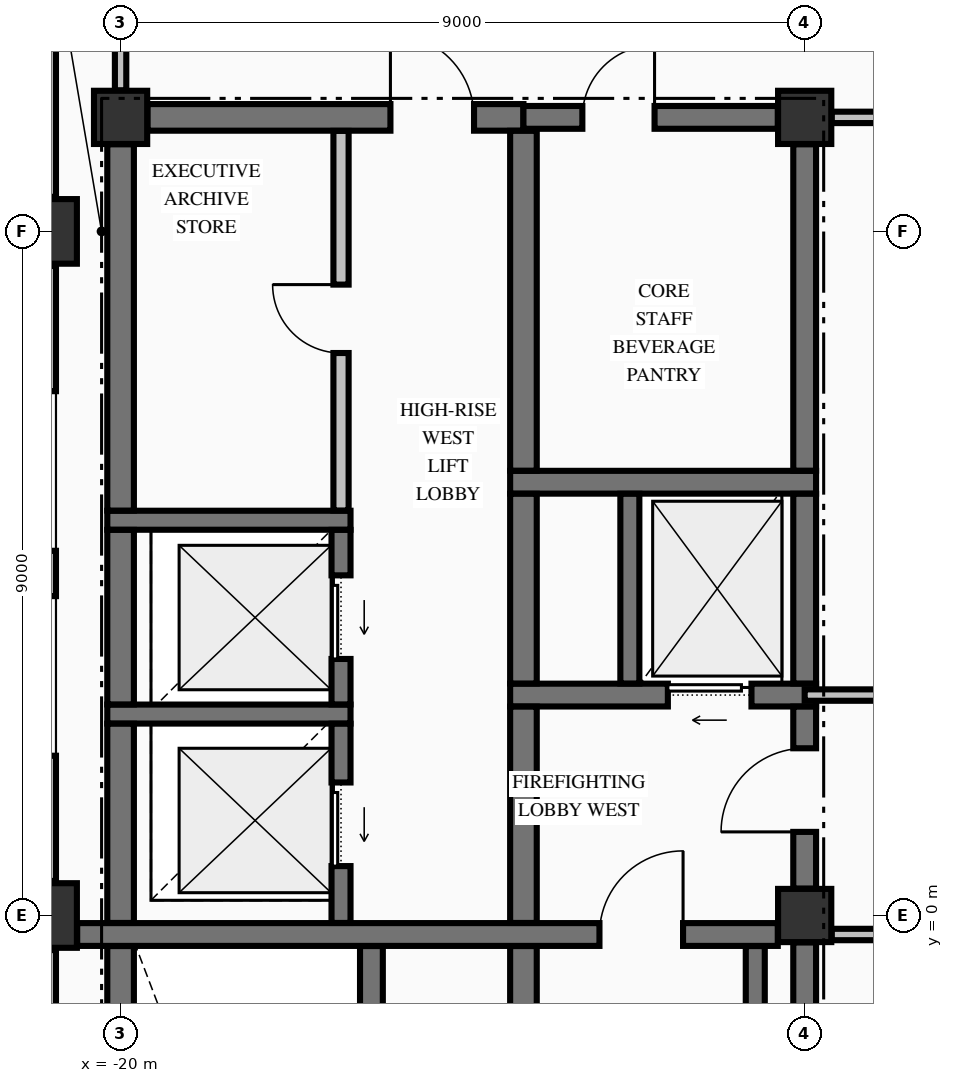
"""IFC4 building model, lengths in metres.
Left out: names, types, materials, properties, quantities, classifications, styles, units other than length and angle.
Written with IfcOpenShell. Run it as: python <this file> out.ifc"""

import sys

from ifc_helpers import new_model, si_unit, direction, frame, frame_2d, origin, origin_2d, place, context, subcontext, project, spatial, rectangle, extrude, element, fill, save


model = new_model("IFC4")
c1 = context("Model", 3, precision=1e-05, world=origin(), true_north=direction((0.0, 1.0)))
c2 = subcontext(c1, "Body", "Model", "MODEL_VIEW")
j1 = project(units=[si_unit("LENGTHUNIT", "METRE"), si_unit("PLANEANGLEUNIT", "RADIAN")], contexts=[c1])
p1 = place(None, origin())
s1 = spatial("IfcSite", under=j1, at=p1, CompositionType="ELEMENT")
p2 = place(p1, origin())
s2 = spatial("IfcBuilding", under=s1, at=p2, CompositionType="ELEMENT")
p3 = place(p2, frame((0.0, 0.0, 236.51)))
s3 = spatial("IfcBuildingStorey", under=s2, at=p3, CompositionType="ELEMENT", Elevation=236.51)
for number, where, z_axis, x_axis in (
    (1, (-21.0, 0.0, -0.25), (0.0, 0.0, 1.0), (1.0, 0.0, 0.0)),
    (2, (-21.0, 9.0, -0.25), (0.0, 0.0, 1.0), (1.0, 0.0, 0.0)),
):
    element("IfcColumn", number, at=place(p3, frame(where, z_axis=z_axis, x_axis=x_axis)), inside=s3, PredefinedType="COLUMN", context=c2, shape_type="SweptSolid", body=[
        extrude(rectangle(XDim=0.85, YDim=0.85, at=origin_2d()), origin(), (0.0, 0.0, 1.0), 3.23),
    ])
for number, where, z_axis, x_axis in (
    (3, (-20.0, 10.5, -0.25), (0.0, 0.0, 1.0), (1.0, 0.0, 0.0)),
    (4, (-11.0, 0.0, -0.25), (0.0, 0.0, 1.0), (1.0, 0.0, 0.0)),
    (5, (-11.0, 10.5, -0.25), (0.0, 0.0, 1.0), (1.0, 0.0, 0.0)),
):
    element("IfcColumn", number, at=place(p3, frame(where, z_axis=z_axis, x_axis=x_axis)), inside=s3, PredefinedType="COLUMN", context=c2, shape_type="SweptSolid", body=[
        extrude(rectangle(XDim=0.7, YDim=0.7, at=origin_2d()), origin(), (0.0, 0.0, 1.0), 3.23),
    ])
p4 = place(p3, frame((-21.0, -0.455, 0.0), z_axis=(0.0, 0.0, 1.0), x_axis=(0.0, -1.0, 0.0)))
e6 = element("IfcWall", 6, at=p4, inside=s3, PredefinedType="STANDARD", context=c2, shape_type="SweptSolid", body=[
    extrude(rectangle(XDim=8.09, YDim=0.3, at=frame_2d((4.045, 0.0))), origin(), (0.0, 0.0, 1.0), 2.372),
])
p5 = place(p4, frame((1.647, 0.0, 0.7)))
e7 = element("IfcOpeningElement", 7, at=p5, cuts=e6, PredefinedType="OPENING", context=c2, shape_type="SweptSolid", body=[
    extrude(rectangle(XDim=2.1, YDim=1.5, at=frame_2d((1.05, 0.75))), frame((0.0, 0.16, 0.0), z_axis=(0.0, -1.0, 0.0), x_axis=(1.0, 0.0, 0.0)), (0.0, 0.0, 1.0), 0.32),
])
p6 = place(p4, frame((4.343, 0.0, 0.7)))
e8 = element("IfcOpeningElement", 8, at=p6, cuts=e6, PredefinedType="OPENING", context=c2, shape_type="SweptSolid", body=[
    extrude(rectangle(XDim=2.1, YDim=1.5, at=frame_2d((1.05, 0.75))), frame((0.0, 0.16, 0.0), z_axis=(0.0, -1.0, 0.0), x_axis=(1.0, 0.0, 0.0)), (0.0, 0.0, 1.0), 0.32),
])
p7 = place(p3, frame((-21.0, 8.545, 0.0), z_axis=(0.0, 0.0, 1.0), x_axis=(0.0, -1.0, 0.0)))
e9 = element("IfcWall", 9, at=p7, inside=s3, PredefinedType="STANDARD", context=c2, shape_type="SweptSolid", body=[
    extrude(rectangle(XDim=8.09, YDim=0.3, at=frame_2d((4.045, 0.0))), origin(), (0.0, 0.0, 1.0), 2.372),
])
p8 = place(p7, frame((1.647, 0.0, 0.7)))
e10 = element("IfcOpeningElement", 10, at=p8, cuts=e9, PredefinedType="OPENING", context=c2, shape_type="SweptSolid", body=[
    extrude(rectangle(XDim=2.1, YDim=1.5, at=frame_2d((1.05, 0.75))), frame((0.0, 0.16, 0.0), z_axis=(0.0, -1.0, 0.0), x_axis=(1.0, 0.0, 0.0)), (0.0, 0.0, 1.0), 0.32),
])
p9 = place(p7, frame((4.343, 0.0, 0.7)))
e11 = element("IfcOpeningElement", 11, at=p9, cuts=e9, PredefinedType="OPENING", context=c2, shape_type="SweptSolid", body=[
    extrude(rectangle(XDim=2.1, YDim=1.5, at=frame_2d((1.05, 0.75))), frame((0.0, 0.16, 0.0), z_axis=(0.0, -1.0, 0.0), x_axis=(1.0, 0.0, 0.0)), (0.0, 0.0, 1.0), 0.32),
])
p10 = place(p3, frame((-21.0, 17.545, 0.0), z_axis=(0.0, 0.0, 1.0), x_axis=(0.0, -1.0, 0.0)))
e12 = element("IfcWall", 12, at=p10, inside=s3, PredefinedType="STANDARD", context=c2, shape_type="SweptSolid", body=[
    extrude(rectangle(XDim=8.09, YDim=0.3, at=frame_2d((4.045, 0.0))), origin(), (0.0, 0.0, 1.0), 2.372),
])
p11 = place(p3, frame((-20.571, -0.25, 0.0), z_axis=(0.0, 0.0, 1.0), x_axis=(1.0, 0.0, 0.0)))
e13 = element("IfcWall", 13, at=p11, inside=s3, PredefinedType="SHEAR", context=c2, shape_type="SweptSolid", body=[
    extrude(rectangle(XDim=9.217, YDim=0.3, at=frame_2d((4.608, 0.0))), origin(), (0.0, 0.0, 1.0), 2.98),
])
p12 = place(p11, frame((6.871, 0.0, 0.0)))
e14 = element("IfcOpeningElement", 14, at=p12, cuts=e13, PredefinedType="OPENING", context=c2, shape_type="SweptSolid", body=[
    extrude(rectangle(XDim=1.1, YDim=2.15, at=frame_2d((0.55, 1.075))), frame((0.0, 0.16, 0.0), z_axis=(0.0, -1.0, 0.0), x_axis=(1.0, 0.0, 0.0)), (0.0, 0.0, 1.0), 0.32),
])
p13 = place(p3, frame((-20.175, 2.65, 0.0), z_axis=(0.0, 0.0, 1.0), x_axis=(1.0, 0.0, 0.0)))
e15 = element("IfcWall", 15, at=p13, inside=s3, PredefinedType="SOLIDWALL", context=c2, shape_type="SweptSolid", body=[
    extrude(rectangle(XDim=3.2, YDim=0.25, at=frame_2d((1.6, 0.0))), origin(), (0.0, 0.0, 1.0), 2.98),
])
p14 = place(p3, frame((-14.875, 2.9, 0.0), z_axis=(0.0, 0.0, 1.0), x_axis=(1.0, 0.0, 0.0)))
e16 = element("IfcWall", 16, at=p14, inside=s3, PredefinedType="SHEAR", context=c2, shape_type="SweptSolid", body=[
    extrude(rectangle(XDim=4.025, YDim=0.3, at=frame_2d((2.012, 0.0))), origin(), (0.0, 0.0, 1.0), 2.98),
])
p15 = place(p14, frame((2.075, 0.0, 0.0)))
e17 = element("IfcOpeningElement", 17, at=p15, cuts=e16, PredefinedType="OPENING", context=c2, shape_type="SweptSolid", body=[
    extrude(rectangle(XDim=1.1, YDim=2.2, at=frame_2d((0.55, 1.1))), frame((0.0, 0.16, 0.0), z_axis=(0.0, -1.0, 0.0), x_axis=(1.0, 0.0, 0.0)), (0.0, 0.0, 1.0), 0.32),
])
p16 = place(p3, frame((-20.175, 5.2, 0.0), z_axis=(0.0, 0.0, 1.0), x_axis=(1.0, 0.0, 0.0)))
e18 = element("IfcWall", 18, at=p16, inside=s3, PredefinedType="SOLIDWALL", context=c2, shape_type="SweptSolid", body=[
    extrude(rectangle(XDim=3.2, YDim=0.25, at=frame_2d((1.6, 0.0))), origin(), (0.0, 0.0, 1.0), 2.98),
])
p17 = place(p3, frame((-14.875, 5.7, 0.0), z_axis=(0.0, 0.0, 1.0), x_axis=(1.0, 0.0, 0.0)))
e19 = element("IfcWall", 19, at=p17, inside=s3, PredefinedType="SHEAR", context=c2, shape_type="SweptSolid", body=[
    extrude(rectangle(XDim=4.025, YDim=0.3, at=frame_2d((2.012, 0.0))), origin(), (0.0, 0.0, 1.0), 2.98),
])
p18 = place(p3, frame((-19.646, 10.5, 0.0), z_axis=(0.0, 0.0, 1.0), x_axis=(1.0, 0.0, 0.0)))
e20 = element("IfcWall", 20, at=p18, inside=s3, PredefinedType="SHEAR", context=c2, shape_type="SweptSolid", body=[
    extrude(rectangle(XDim=4.946, YDim=0.35, at=frame_2d((2.473, 0.0))), origin(), (0.0, 0.0, 1.0), 2.98),
])
p19 = place(p18, frame((3.196, 0.0, 0.0)))
e21 = element("IfcOpeningElement", 21, at=p19, cuts=e20, PredefinedType="OPENING", context=c2, shape_type="SweptSolid", body=[
    extrude(rectangle(XDim=1.1, YDim=2.15, at=frame_2d((0.55, 1.075))), frame((0.0, 0.185, 0.0), z_axis=(0.0, -1.0, 0.0), x_axis=(1.0, 0.0, 0.0)), (0.0, 0.0, 1.0), 0.37),
])
p20 = place(p3, frame((-14.7, 10.5, 0.0), z_axis=(0.0, 0.0, 1.0), x_axis=(1.0, 0.0, 0.0)))
e22 = element("IfcWall", 22, at=p20, inside=s3, PredefinedType="SHEAR", context=c2, shape_type="SweptSolid", body=[
    extrude(rectangle(XDim=3.346, YDim=0.3, at=frame_2d((1.673, 0.0))), origin(), (0.0, 0.0, 1.0), 2.98),
])
p21 = place(p20, frame((0.775, 0.0, 0.0)))
e23 = element("IfcOpeningElement", 23, at=p21, cuts=e22, PredefinedType="OPENING", context=c2, shape_type="SweptSolid", body=[
    extrude(rectangle(XDim=0.95, YDim=2.15, at=frame_2d((0.475, 1.075))), frame((0.0, 0.16, 0.0), z_axis=(0.0, -1.0, 0.0), x_axis=(1.0, 0.0, 0.0)), (0.0, 0.0, 1.0), 0.32),
])
p22 = place(p3, frame((-10.644, -0.25, 0.0), z_axis=(0.0, 0.0, 1.0), x_axis=(1.0, 0.0, 0.0)))
e24 = element("IfcWall", 24, at=p22, inside=s3, PredefinedType="PARTITIONING", context=c2, shape_type="SweptSolid", body=[
    extrude(rectangle(XDim=21.288, YDim=0.15, at=frame_2d((10.644, 0.0))), origin(), (0.0, 0.0, 1.0), 2.98),
])
p23 = place(p22, frame((6.394, 0.0, 0.0)))
e25 = element("IfcOpeningElement", 25, at=p23, cuts=e24, PredefinedType="OPENING", context=c2, shape_type="SweptSolid", body=[
    extrude(rectangle(XDim=1.1, YDim=2.15, at=frame_2d((0.55, 1.075))), frame((0.0, 0.085, 0.0), z_axis=(0.0, -1.0, 0.0), x_axis=(1.0, 0.0, 0.0)), (0.0, 0.0, 1.0), 0.17),
])
p24 = place(p22, frame((2.219, 0.0, 0.0)))
e26 = element("IfcOpeningElement", 26, at=p24, cuts=e24, PredefinedType="OPENING", context=c2, shape_type="SweptSolid", body=[
    extrude(rectangle(XDim=1.05, YDim=2.15, at=frame_2d((0.525, 1.075))), frame((0.0, 0.085, 0.0), z_axis=(0.0, -1.0, 0.0), x_axis=(1.0, 0.0, 0.0)), (0.0, 0.0, 1.0), 0.17),
])
p25 = place(p22, frame((14.369, 0.0, 0.0)))
e27 = element("IfcOpeningElement", 27, at=p25, cuts=e24, PredefinedType="OPENING", context=c2, shape_type="SweptSolid", body=[
    extrude(rectangle(XDim=0.95, YDim=2.15, at=frame_2d((0.475, 1.075))), frame((0.0, 0.085, 0.0), z_axis=(0.0, -1.0, 0.0), x_axis=(1.0, 0.0, 0.0)), (0.0, 0.0, 1.0), 0.17),
])
p26 = place(p3, frame((-11.0, 2.9, 0.0), z_axis=(0.0, 0.0, 1.0), x_axis=(1.0, 0.0, 0.0)))
e28 = element("IfcWall", 28, at=p26, inside=s3, PredefinedType="PARTITIONING", context=c2, shape_type="SweptSolid", body=[
    extrude(rectangle(XDim=22.0, YDim=0.15, at=frame_2d((11.0, 0.0))), origin(), (0.0, 0.0, 1.0), 2.98),
])
p27 = place(p26, frame((6.75, 0.0, 0.0)))
e29 = element("IfcOpeningElement", 29, at=p27, cuts=e28, PredefinedType="OPENING", context=c2, shape_type="SweptSolid", body=[
    extrude(rectangle(XDim=1.1, YDim=2.15, at=frame_2d((0.55, 1.075))), frame((0.0, 0.085, 0.0), z_axis=(0.0, -1.0, 0.0), x_axis=(1.0, 0.0, 0.0)), (0.0, 0.0, 1.0), 0.17),
])
p28 = place(p26, frame((2.575, 0.0, 0.0)))
e30 = element("IfcOpeningElement", 30, at=p28, cuts=e28, PredefinedType="OPENING", context=c2, shape_type="SweptSolid", body=[
    extrude(rectangle(XDim=1.05, YDim=2.15, at=frame_2d((0.525, 1.075))), frame((0.0, 0.085, 0.0), z_axis=(0.0, -1.0, 0.0), x_axis=(1.0, 0.0, 0.0)), (0.0, 0.0, 1.0), 0.17),
])
p29 = place(p26, frame((14.65, 0.0, 0.0)))
e31 = element("IfcOpeningElement", 31, at=p29, cuts=e28, PredefinedType="OPENING", context=c2, shape_type="SweptSolid", body=[
    extrude(rectangle(XDim=1.1, YDim=2.15, at=frame_2d((0.55, 1.075))), frame((0.0, 0.085, 0.0), z_axis=(0.0, -1.0, 0.0), x_axis=(1.0, 0.0, 0.0)), (0.0, 0.0, 1.0), 0.17),
])
p30 = place(p3, frame((-10.644, 10.5, 0.0), z_axis=(0.0, 0.0, 1.0), x_axis=(1.0, 0.0, 0.0)))
e32 = element("IfcWall", 32, at=p30, inside=s3, PredefinedType="PARTITIONING", context=c2, shape_type="SweptSolid", body=[
    extrude(rectangle(XDim=21.288, YDim=0.15, at=frame_2d((10.644, 0.0))), origin(), (0.0, 0.0, 1.0), 2.98),
])
p31 = place(p30, frame((6.394, 0.0, 0.0)))
e33 = element("IfcOpeningElement", 33, at=p31, cuts=e32, PredefinedType="OPENING", context=c2, shape_type="SweptSolid", body=[
    extrude(rectangle(XDim=1.1, YDim=2.15, at=frame_2d((0.55, 1.075))), frame((0.0, 0.085, 0.0), z_axis=(0.0, -1.0, 0.0), x_axis=(1.0, 0.0, 0.0)), (0.0, 0.0, 1.0), 0.17),
])
p32 = place(p3, frame((-20.0, -9.596, 0.0), z_axis=(0.0, 0.0, 1.0), x_axis=(0.0, 1.0, 0.0)))
e34 = element("IfcWall", 34, at=p32, inside=s3, PredefinedType="SHEAR", context=c2, shape_type="SweptSolid", body=[
    extrude(rectangle(XDim=9.194, YDim=0.35, at=frame_2d((4.597, 0.0))), origin(), (0.0, 0.0, 1.0), 2.98),
])
p33 = place(p3, frame((-20.0, -0.098, 0.0), z_axis=(0.0, 0.0, 1.0), x_axis=(0.0, 1.0, 0.0)))
e35 = element("IfcWall", 35, at=p33, inside=s3, PredefinedType="SHEAR", context=c2, shape_type="SweptSolid", body=[
    extrude(rectangle(XDim=2.621, YDim=0.35, at=frame_2d((1.311, 0.0))), origin(), (0.0, 0.0, 1.0), 2.98),
])
p34 = place(p3, frame((-20.0, 2.777, 0.0), z_axis=(0.0, 0.0, 1.0), x_axis=(0.0, 1.0, 0.0)))
e36 = element("IfcWall", 36, at=p34, inside=s3, PredefinedType="SHEAR", context=c2, shape_type="SweptSolid", body=[
    extrude(rectangle(XDim=2.296, YDim=0.35, at=frame_2d((1.148, 0.0))), origin(), (0.0, 0.0, 1.0), 2.98),
])
p35 = place(p3, frame((-20.0, 5.327, 0.0), z_axis=(0.0, 0.0, 1.0), x_axis=(0.0, 1.0, 0.0)))
e37 = element("IfcWall", 37, at=p35, inside=s3, PredefinedType="SHEAR", context=c2, shape_type="SweptSolid", body=[
    extrude(rectangle(XDim=4.819, YDim=0.35, at=frame_2d((2.41, 0.0))), origin(), (0.0, 0.0, 1.0), 2.98),
])
p36 = place(p3, frame((-17.1, -0.098, 0.0), z_axis=(0.0, 0.0, 1.0), x_axis=(0.0, 1.0, 0.0)))
e38 = element("IfcWall", 38, at=p36, inside=s3, PredefinedType="SOLIDWALL", context=c2, shape_type="SweptSolid", body=[
    extrude(rectangle(XDim=2.621, YDim=0.25, at=frame_2d((1.311, 0.0))), origin(), (0.0, 0.0, 1.0), 2.98),
])
p37 = place(p36, frame((0.748, 0.0, 0.0)))
e39 = element("IfcOpeningElement", 39, at=p37, cuts=e38, PredefinedType="OPENING", context=c2, shape_type="SweptSolid", body=[
    extrude(rectangle(XDim=1.1, YDim=2.2, at=frame_2d((0.55, 1.1))), frame((0.0, 0.135, 0.0), z_axis=(0.0, -1.0, 0.0), x_axis=(1.0, 0.0, 0.0)), (0.0, 0.0, 1.0), 0.27),
])
p38 = place(p3, frame((-17.1, 2.777, 0.0), z_axis=(0.0, 0.0, 1.0), x_axis=(0.0, 1.0, 0.0)))
e40 = element("IfcWall", 40, at=p38, inside=s3, PredefinedType="SOLIDWALL", context=c2, shape_type="SweptSolid", body=[
    extrude(rectangle(XDim=2.296, YDim=0.25, at=frame_2d((1.148, 0.0))), origin(), (0.0, 0.0, 1.0), 2.98),
])
p39 = place(p38, frame((0.598, 0.0, 0.0)))
e41 = element("IfcOpeningElement", 41, at=p39, cuts=e40, PredefinedType="OPENING", context=c2, shape_type="SweptSolid", body=[
    extrude(rectangle(XDim=1.1, YDim=2.2, at=frame_2d((0.55, 1.1))), frame((0.0, 0.135, 0.0), z_axis=(0.0, -1.0, 0.0), x_axis=(1.0, 0.0, 0.0)), (0.0, 0.0, 1.0), 0.27),
])
p40 = place(p3, frame((-16.7, -9.773, 0.0), z_axis=(0.0, 0.0, 1.0), x_axis=(0.0, 1.0, 0.0)))
e42 = element("IfcWall", 42, at=p40, inside=s3, PredefinedType="SHEAR", context=c2, shape_type="SweptSolid", body=[
    extrude(rectangle(XDim=9.371, YDim=0.3, at=frame_2d((4.686, 0.0))), origin(), (0.0, 0.0, 1.0), 2.98),
])
p41 = place(p3, frame((-14.7, -9.773, 0.0), z_axis=(0.0, 0.0, 1.0), x_axis=(0.0, 1.0, 0.0)))
e43 = element("IfcWall", 43, at=p41, inside=s3, PredefinedType="SHEAR", context=c2, shape_type="SweptSolid", body=[
    extrude(rectangle(XDim=9.371, YDim=0.35, at=frame_2d((4.686, 0.0))), origin(), (0.0, 0.0, 1.0), 2.98),
])
p42 = place(p3, frame((-14.7, -0.098, 0.0), z_axis=(0.0, 0.0, 1.0), x_axis=(0.0, 1.0, 0.0)))
e44 = element("IfcWall", 44, at=p42, inside=s3, PredefinedType="SHEAR", context=c2, shape_type="SweptSolid", body=[
    extrude(rectangle(XDim=2.846, YDim=0.35, at=frame_2d((1.423, 0.0))), origin(), (0.0, 0.0, 1.0), 2.98),
])
p43 = place(p3, frame((-14.7, 3.052, 0.0), z_axis=(0.0, 0.0, 1.0), x_axis=(0.0, 1.0, 0.0)))
e45 = element("IfcWall", 45, at=p43, inside=s3, PredefinedType="SHEAR", context=c2, shape_type="SweptSolid", body=[
    extrude(rectangle(XDim=2.496, YDim=0.35, at=frame_2d((1.248, 0.0))), origin(), (0.0, 0.0, 1.0), 2.98),
])
p44 = place(p3, frame((-14.7, 5.852, 0.0), z_axis=(0.0, 0.0, 1.0), x_axis=(0.0, 1.0, 0.0)))
e46 = element("IfcWall", 46, at=p44, inside=s3, PredefinedType="SHEAR", context=c2, shape_type="SweptSolid", body=[
    extrude(rectangle(XDim=4.471, YDim=0.35, at=frame_2d((2.235, 0.0))), origin(), (0.0, 0.0, 1.0), 2.98),
])
p45 = place(p3, frame((-13.3, 3.052, 0.0), z_axis=(0.0, 0.0, 1.0), x_axis=(0.0, 1.0, 0.0)))
e47 = element("IfcWall", 47, at=p45, inside=s3, PredefinedType="SOLIDWALL", context=c2, shape_type="SweptSolid", body=[
    extrude(rectangle(XDim=2.496, YDim=0.25, at=frame_2d((1.248, 0.0))), origin(), (0.0, 0.0, 1.0), 2.98),
])
p46 = place(p3, frame((-11.65, -9.798, 0.0), z_axis=(0.0, 0.0, 1.0), x_axis=(0.0, 1.0, 0.0)))
e48 = element("IfcWall", 48, at=p46, inside=s3, PredefinedType="SOLIDWALL", context=c2, shape_type="SweptSolid", body=[
    extrude(rectangle(XDim=9.396, YDim=0.25, at=frame_2d((4.698, 0.0))), origin(), (0.0, 0.0, 1.0), 2.98),
])
p47 = place(p3, frame((-11.0, -9.596, 0.0), z_axis=(0.0, 0.0, 1.0), x_axis=(0.0, 1.0, 0.0)))
e49 = element("IfcWall", 49, at=p47, inside=s3, PredefinedType="SHEAR", context=c2, shape_type="SweptSolid", body=[
    extrude(rectangle(XDim=9.242, YDim=0.3, at=frame_2d((4.621, 0.0))), origin(), (0.0, 0.0, 1.0), 2.98),
])
p48 = place(p3, frame((-11.0, 0.354, 0.0), z_axis=(0.0, 0.0, 1.0), x_axis=(0.0, 1.0, 0.0)))
e50 = element("IfcWall", 50, at=p48, inside=s3, PredefinedType="SHEAR", context=c2, shape_type="SweptSolid", body=[
    extrude(rectangle(XDim=2.394, YDim=0.3, at=frame_2d((1.197, 0.0))), origin(), (0.0, 0.0, 1.0), 2.98),
])
p49 = place(p48, frame((0.746, 0.0, 0.0)))
e51 = element("IfcOpeningElement", 51, at=p49, cuts=e50, PredefinedType="OPENING", context=c2, shape_type="SweptSolid", body=[
    extrude(rectangle(XDim=1.1, YDim=2.15, at=frame_2d((0.55, 1.075))), frame((0.0, 0.16, 0.0), z_axis=(0.0, -1.0, 0.0), x_axis=(1.0, 0.0, 0.0)), (0.0, 0.0, 1.0), 0.32),
])
p50 = place(p3, frame((-11.0, 3.052, 0.0), z_axis=(0.0, 0.0, 1.0), x_axis=(0.0, 1.0, 0.0)))
e52 = element("IfcWall", 52, at=p50, inside=s3, PredefinedType="SHEAR", context=c2, shape_type="SweptSolid", body=[
    extrude(rectangle(XDim=2.496, YDim=0.3, at=frame_2d((1.248, 0.0))), origin(), (0.0, 0.0, 1.0), 2.98),
])
p51 = place(p3, frame((-11.0, 5.852, 0.0), z_axis=(0.0, 0.0, 1.0), x_axis=(0.0, 1.0, 0.0)))
e53 = element("IfcWall", 53, at=p51, inside=s3, PredefinedType="SHEAR", context=c2, shape_type="SweptSolid", body=[
    extrude(rectangle(XDim=4.294, YDim=0.3, at=frame_2d((2.147, 0.0))), origin(), (0.0, 0.0, 1.0), 2.98),
])
p52 = place(p3, frame((-20.0, 10.856, 0.0), z_axis=(0.0, 0.0, 1.0), x_axis=(0.0, 1.0, 0.0)))
e54 = element("IfcWall", 54, at=p52, inside=s3, PredefinedType="PARTITIONING", context=c2, shape_type="SweptSolid", body=[
    extrude(rectangle(XDim=2.416, YDim=0.15, at=frame_2d((1.208, 0.0))), origin(), (0.0, 0.0, 1.0), 2.57),
])
p53 = place(p3, frame((-17.1, 5.328, 0.0), z_axis=(0.0, 0.0, 1.0), x_axis=(0.0, 1.0, 0.0)))
e55 = element("IfcWall", 55, at=p53, inside=s3, PredefinedType="PARTITIONING", context=c2, shape_type="SweptSolid", body=[
    extrude(rectangle(XDim=4.994, YDim=0.2, at=frame_2d((2.497, 0.0))), origin(), (0.0, 0.0, 1.0), 2.98),
])
p54 = place(p53, frame((2.072, 0.0, 0.0)))
e56 = element("IfcOpeningElement", 56, at=p54, cuts=e55, PredefinedType="OPENING", context=c2, shape_type="SweptSolid", body=[
    extrude(rectangle(XDim=0.9, YDim=2.15, at=frame_2d((0.45, 1.075))), frame((0.0, 0.11, 0.0), z_axis=(0.0, -1.0, 0.0), x_axis=(1.0, 0.0, 0.0)), (0.0, 0.0, 1.0), 0.22),
])
p55 = place(p12, origin())
e57 = element("IfcDoor", 57, at=p55, inside=s3, OperationType="SINGLE_SWING_RIGHT", PredefinedType="DOOR", context=c2, shape_type="SweptSolid", body=[
    extrude(rectangle(XDim=1.1, YDim=2.15, at=frame_2d((0.55, 1.075))), frame((0.0, 0.025, 0.0), z_axis=(0.0, -1.0, 0.0), x_axis=(1.0, 0.0, 0.0)), (0.0, 0.0, 1.0), 0.05),
])
fill(e14, e57)
p56 = place(p49, origin())
e58 = element("IfcDoor", 58, at=p56, inside=s3, OperationType="SINGLE_SWING_LEFT", PredefinedType="DOOR", context=c2, shape_type="SweptSolid", body=[
    extrude(rectangle(XDim=1.1, YDim=2.15, at=frame_2d((0.55, 1.075))), frame((0.0, 0.025, 0.0), z_axis=(0.0, -1.0, 0.0), x_axis=(1.0, 0.0, 0.0)), (0.0, 0.0, 1.0), 0.05),
])
fill(e51, e58)
p57 = place(p15, origin())
e59 = element("IfcDoor", 59, at=p57, inside=s3, OperationType="SLIDING_TO_LEFT", PredefinedType="DOOR", context=c2, shape_type="SweptSolid", body=[
    extrude(rectangle(XDim=1.1, YDim=2.2, at=frame_2d((0.55, 1.1))), frame((0.0, 0.025, 0.0), z_axis=(0.0, -1.0, 0.0), x_axis=(1.0, 0.0, 0.0)), (0.0, 0.0, 1.0), 0.05),
])
fill(e17, e59)
p58 = place(p21, origin())
e60 = element("IfcDoor", 60, at=p58, inside=s3, OperationType="SINGLE_SWING_RIGHT", PredefinedType="DOOR", context=c2, shape_type="SweptSolid", body=[
    extrude(rectangle(XDim=0.95, YDim=2.15, at=frame_2d((0.475, 1.075))), frame((0.0, 0.025, 0.0), z_axis=(0.0, -1.0, 0.0), x_axis=(1.0, 0.0, 0.0)), (0.0, 0.0, 1.0), 0.05),
])
fill(e23, e60)
p59 = place(p37, origin())
e61 = element("IfcDoor", 61, at=p59, inside=s3, OperationType="SLIDING_TO_LEFT", PredefinedType="DOOR", context=c2, shape_type="SweptSolid", body=[
    extrude(rectangle(XDim=1.1, YDim=2.2, at=frame_2d((0.55, 1.1))), frame((0.0, 0.025, 0.0), z_axis=(0.0, -1.0, 0.0), x_axis=(1.0, 0.0, 0.0)), (0.0, 0.0, 1.0), 0.05),
])
fill(e39, e61)
p60 = place(p39, origin())
e62 = element("IfcDoor", 62, at=p60, inside=s3, OperationType="SLIDING_TO_LEFT", PredefinedType="DOOR", context=c2, shape_type="SweptSolid", body=[
    extrude(rectangle(XDim=1.1, YDim=2.2, at=frame_2d((0.55, 1.1))), frame((0.0, 0.025, 0.0), z_axis=(0.0, -1.0, 0.0), x_axis=(1.0, 0.0, 0.0)), (0.0, 0.0, 1.0), 0.05),
])
fill(e41, e62)
p61 = place(p19, origin())
e63 = element("IfcDoor", 63, at=p61, inside=s3, OperationType="SINGLE_SWING_LEFT", PredefinedType="DOOR", context=c2, shape_type="SweptSolid", body=[
    extrude(rectangle(XDim=1.1, YDim=2.15, at=frame_2d((0.55, 1.075))), frame((0.0, 0.025, 0.0), z_axis=(0.0, -1.0, 0.0), x_axis=(1.0, 0.0, 0.0)), (0.0, 0.0, 1.0), 0.05),
])
fill(e21, e63)
p62 = place(p54, origin())
e64 = element("IfcDoor", 64, at=p62, inside=s3, OperationType="SINGLE_SWING_RIGHT", PredefinedType="DOOR", context=c2, shape_type="SweptSolid", body=[
    extrude(rectangle(XDim=0.9, YDim=2.15, at=frame_2d((0.45, 1.075))), frame((0.0, 0.025, 0.0), z_axis=(0.0, -1.0, 0.0), x_axis=(1.0, 0.0, 0.0)), (0.0, 0.0, 1.0), 0.05),
])
fill(e56, e64)
save(model, sys.argv[1])
